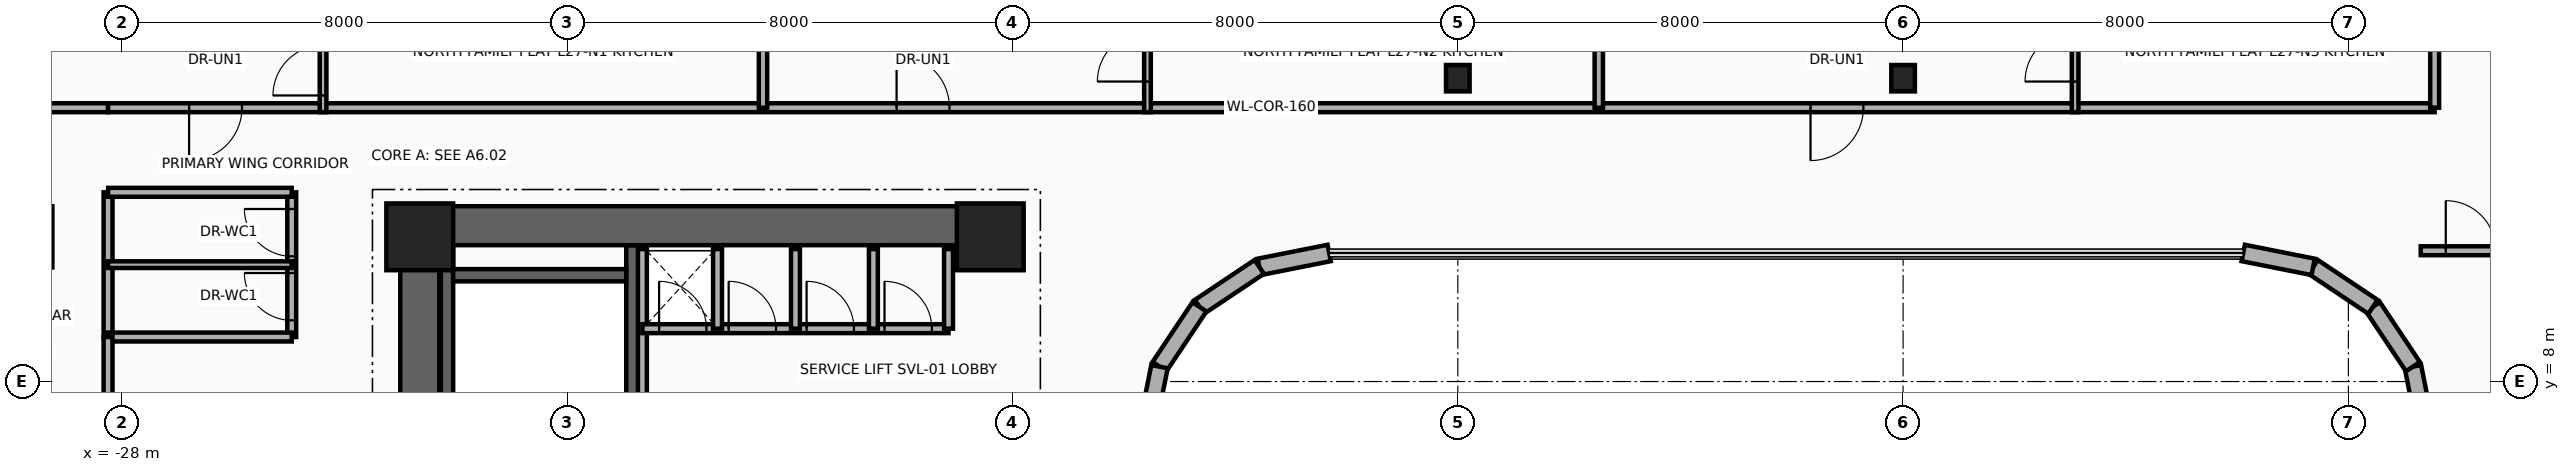
"""IFC4 building model, lengths in metres.
Left out: names, types, materials, properties, quantities, classifications, styles, units other than length and angle.
Written with IfcOpenShell. Run it as: python <this file> out.ifc"""

import sys

from ifc_helpers import new_model, si_unit, direction, frame, frame_2d, origin, origin_2d, place, context, subcontext, project, spatial, rectangle, i_section, extrude, source, transform, mapped, element, fill, save


model = new_model("IFC4")
c1 = context("Model", 3, precision=1e-05, world=origin(), true_north=direction((0.0, 1.0)))
c2 = subcontext(c1, "Body", "Model", "MODEL_VIEW")
j1 = project(units=[si_unit("LENGTHUNIT", "METRE"), si_unit("PLANEANGLEUNIT", "RADIAN")], contexts=[c1])
p1 = place(None, origin())
s1 = spatial("IfcSite", under=j1, at=p1, CompositionType="ELEMENT")
p2 = place(p1, origin())
s2 = spatial("IfcBuilding", under=s1, at=p2, CompositionType="ELEMENT")
p3 = place(p2, frame((0.0, 0.0, 109.4)))
s3 = spatial("IfcBuildingStorey", under=s2, at=p3, CompositionType="ELEMENT", Elevation=109.4)
for number, where, z_axis, x_axis in (
    (1, (-22.16, 1.78, 0.0), (0.0, 0.0, 1.0), (0.0, 1.0, 0.0)),
    (2, (-18.83, 1.78, 0.0), (0.0, 0.0, 1.0), (0.0, 1.0, 0.0)),
):
    element("IfcWall", number, at=place(p3, frame(where, z_axis=z_axis, x_axis=x_axis)), inside=s3, PredefinedType="SHEAR", context=c2, shape_type="SweptSolid", body=[
        extrude(rectangle(XDim=8.67, YDim=0.22, at=frame_2d((4.335, 0.0))), origin(), (0.0, 0.0, 1.0), 3.46),
    ])
p4 = place(p3, frame((-22.05, 9.91, 0.0), z_axis=(0.0, 0.0, 1.0), x_axis=(1.0, 0.0, 0.0)))
e3 = element("IfcWall", 3, at=p4, inside=s3, PredefinedType="SHEAR", context=c2, shape_type="SweptSolid", body=[
    extrude(rectangle(XDim=3.11, YDim=0.22, at=frame_2d((1.555, 0.0))), origin(), (0.0, 0.0, 1.0), 3.46),
])
p5 = place(p3, frame((-22.65, -11.15, 0.0), z_axis=(0.0, 0.0, 1.0), x_axis=(0.0, 1.0, 0.0)))
e4 = element("IfcWall", 4, at=p5, inside=s3, PredefinedType="SHEAR", context=c2, shape_type="SweptSolid", body=[
    extrude(rectangle(XDim=22.3, YDim=0.7, at=frame_2d((11.15, 0.0))), origin(), (0.0, 0.0, 1.0), 3.46),
])
p6 = place(p3, frame((-22.65, 10.8, 0.0), z_axis=(0.0, 0.0, 1.0), x_axis=(1.0, 0.0, 0.0)))
e5 = element("IfcWall", 5, at=p6, inside=s3, PredefinedType="SHEAR", context=c2, shape_type="SweptSolid", body=[
    extrude(rectangle(XDim=10.25, YDim=0.7, at=frame_2d((5.125, 0.0))), origin(), (0.0, 0.0, 1.0), 3.46),
])
m1 = source(origin(), c2, "Body", "SweptSolid", [
    extrude(rectangle(XDim=1.2, YDim=1.2, at=origin_2d()), origin(), (0.0, 0.0, 1.0), 3.7),
])
for number, where, z_axis, x_axis in (
    (6, (-22.65, 10.6, 0.0), (0.0, 0.0, 1.0), (1.0, 0.0, 0.0)),
    (7, (-12.4, 10.6, 0.0), (0.0, 0.0, 1.0), (1.0, 0.0, 0.0)),
):
    element("IfcColumn", number, at=place(p3, frame(where, z_axis=z_axis, x_axis=x_axis)), inside=s3, PredefinedType="COLUMN", context=c2, shape_type="MappedRepresentation", body=[
        mapped(m1, transform((0.0, 0.0, 0.0), x_axis=(1.0, 0.0, 0.0), y_axis=(0.0, 1.0, 0.0), z_axis=(0.0, 0.0, 1.0), scale=1.0)),
    ])
m2 = source(origin(), c2, "Body", "SweptSolid", [
    extrude(i_section(OverallWidth=0.424, OverallDepth=0.474, WebThickness=0.048, FlangeThickness=0.077, at=origin_2d()), origin(), (0.0, 0.0, 1.0), 3.7),
])
for number, where, z_axis, x_axis in (
    (8, (-4.0, 13.45, 0.0), (0.0, 0.0, 1.0), (1.0, 0.0, 0.0)),
    (9, (4.0, 13.45, 0.0), (0.0, 0.0, 1.0), (1.0, 0.0, 0.0)),
):
    element("IfcColumn", number, at=place(p3, frame(where, z_axis=z_axis, x_axis=x_axis)), inside=s3, PredefinedType="COLUMN", context=c2, shape_type="MappedRepresentation", body=[
        mapped(m2, transform((0.0, 0.0, 0.0), x_axis=(1.0, 0.0, 0.0), y_axis=(0.0, 1.0, 0.0), z_axis=(0.0, 0.0, 1.0), scale=1.0)),
    ])
p7 = place(p3, frame((13.41, 7.011, 0.0), z_axis=(0.0, 0.0, 1.0), x_axis=(-0.195090163074, 0.980785312019, 0.0)))
e10 = element("IfcWall", 10, at=p7, inside=s3, PredefinedType="SOLIDWALL", context=c2, shape_type="SweptSolid", body=[
    extrude(rectangle(XDim=1.281, YDim=0.3, at=frame_2d((0.641, 0.0))), origin(), (0.0, 0.0, 1.0), 3.46),
])
for number, where, z_axis, x_axis in (
    (11, (13.16, 8.268, 0.0), (0.0, 0.0, 1.0), (-0.556, 0.831, 0.0)),
    (12, (12.442, 9.342, 0.0), (0.0, 0.0, 1.0), (-0.831, 0.556, 0.0)),
):
    element("IfcWall", number, at=place(p3, frame(where, z_axis=z_axis, x_axis=x_axis)), inside=s3, PredefinedType="SOLIDWALL", context=c2, shape_type="SweptSolid", body=[
        extrude(rectangle(XDim=1.292, YDim=0.3, at=frame_2d((0.646, 0.0))), origin(), (0.0, 0.0, 1.0), 3.46),
    ])
for number, where, z_axis, x_axis in (
    (13, (11.367, 10.06, 0.0), (0.0, 0.0, 1.0), (-0.981, 0.195, 0.0)),
    (14, (-6.311, 10.31, 0.0), (0.0, 0.0, 1.0), (-0.981, -0.195, 0.0)),
):
    element("IfcWall", number, at=place(p3, frame(where, z_axis=z_axis, x_axis=x_axis)), inside=s3, PredefinedType="SOLIDWALL", context=c2, shape_type="SweptSolid", body=[
        extrude(rectangle(XDim=1.281, YDim=0.3, at=frame_2d((0.641, 0.0))), origin(), (0.0, 0.0, 1.0), 3.46),
    ])
p8 = place(p3, frame((-7.567, 10.06, 0.0), z_axis=(0.0, 0.0, 1.0), x_axis=(-0.831497739511, -0.555528135371, 0.0)))
e15 = element("IfcWall", 15, at=p8, inside=s3, PredefinedType="SOLIDWALL", context=c2, shape_type="SweptSolid", body=[
    extrude(rectangle(XDim=1.292, YDim=0.3, at=frame_2d((0.646, 0.0))), origin(), (0.0, 0.0, 1.0), 3.46),
])
p9 = place(p3, frame((-8.642, 9.342, 0.0), z_axis=(0.0, 0.0, 1.0), x_axis=(-0.555615398575, -0.831439431869, 0.0)))
e16 = element("IfcWall", 16, at=p9, inside=s3, PredefinedType="SOLIDWALL", context=c2, shape_type="SweptSolid", body=[
    extrude(rectangle(XDim=1.292, YDim=0.3, at=frame_2d((0.646, 0.0))), origin(), (0.0, 0.0, 1.0), 3.46),
])
p10 = place(p3, frame((-9.36, 8.268, 0.0), z_axis=(0.0, 0.0, 1.0), x_axis=(-0.195090163074, -0.980785312019, 0.0)))
e17 = element("IfcWall", 17, at=p10, inside=s3, PredefinedType="SOLIDWALL", context=c2, shape_type="SweptSolid", body=[
    extrude(rectangle(XDim=1.281, YDim=0.3, at=frame_2d((0.641, 0.0))), origin(), (0.0, 0.0, 1.0), 3.46),
])
p11 = place(p3, frame((-18.65, 7.45, 0.0), z_axis=(0.0, 0.0, 1.0), x_axis=(0.0, 1.0, 0.0)))
e18 = element("IfcWall", 18, at=p11, inside=s3, PredefinedType="PARTITIONING", context=c2, shape_type="SweptSolid", body=[
    extrude(rectangle(XDim=2.93, YDim=0.16, at=frame_2d((1.465, 0.0))), origin(), (0.0, 0.0, 1.0), 3.46),
])
p12 = place(p3, frame((-18.65, 8.95, 0.0), z_axis=(0.0, 0.0, 1.0), x_axis=(1.0, 0.0, 0.0)))
e19 = element("IfcWall", 19, at=p12, inside=s3, PredefinedType="PARTITIONING", context=c2, shape_type="SweptSolid", body=[
    extrude(rectangle(XDim=5.5, YDim=0.16, at=frame_2d((2.75, 0.0))), origin(), (0.0, 0.0, 1.0), 3.46),
])
p13 = place(p12, frame((0.3, 0.0, 0.0)))
e20 = element("IfcOpeningElement", 20, at=p13, cuts=e19, PredefinedType="OPENING", context=c2, shape_type="SweptSolid", body=[
    extrude(rectangle(XDim=0.85, YDim=2.05, at=frame_2d((0.425, 1.025))), frame((0.0, 0.095, 0.0), z_axis=(0.0, -1.0, 0.0), x_axis=(1.0, 0.0, 0.0)), (0.0, 0.0, 1.0), 0.19),
])
p14 = place(p12, frame((1.55, 0.0, 0.0)))
e21 = element("IfcOpeningElement", 21, at=p14, cuts=e19, PredefinedType="OPENING", context=c2, shape_type="SweptSolid", body=[
    extrude(rectangle(XDim=0.85, YDim=2.05, at=frame_2d((0.425, 1.025))), frame((0.0, 0.095, 0.0), z_axis=(0.0, -1.0, 0.0), x_axis=(1.0, 0.0, 0.0)), (0.0, 0.0, 1.0), 0.19),
])
p15 = place(p12, frame((2.95, 0.0, 0.0)))
e22 = element("IfcOpeningElement", 22, at=p15, cuts=e19, PredefinedType="OPENING", context=c2, shape_type="SweptSolid", body=[
    extrude(rectangle(XDim=0.85, YDim=2.05, at=frame_2d((0.425, 1.025))), frame((0.0, 0.095, 0.0), z_axis=(0.0, -1.0, 0.0), x_axis=(1.0, 0.0, 0.0)), (0.0, 0.0, 1.0), 0.19),
])
p16 = place(p12, frame((4.35, 0.0, 0.0)))
e23 = element("IfcOpeningElement", 23, at=p16, cuts=e19, PredefinedType="OPENING", context=c2, shape_type="SweptSolid", body=[
    extrude(rectangle(XDim=0.85, YDim=2.05, at=frame_2d((0.425, 1.025))), frame((0.0, 0.095, 0.0), z_axis=(0.0, -1.0, 0.0), x_axis=(1.0, 0.0, 0.0)), (0.0, 0.0, 1.0), 0.19),
])
for number, where, z_axis, x_axis in (
    (24, (-13.15, 8.95, 0.0), (0.0, 0.0, 1.0), (0.0, 1.0, 0.0)),
    (25, (-17.3, 8.95, 0.0), (0.0, 0.0, 1.0), (0.0, 1.0, 0.0)),
    (26, (-15.9, 8.95, 0.0), (0.0, 0.0, 1.0), (0.0, 1.0, 0.0)),
    (27, (-14.5, 8.95, 0.0), (0.0, 0.0, 1.0), (0.0, 1.0, 0.0)),
):
    element("IfcWall", number, at=place(p3, frame(where, z_axis=z_axis, x_axis=x_axis)), inside=s3, PredefinedType="PARTITIONING", context=c2, shape_type="SweptSolid", body=[
        extrude(rectangle(XDim=1.43, YDim=0.16, at=frame_2d((0.715, 0.0))), origin(), (0.0, 0.0, 1.0), 3.46),
    ])
p17 = place(p3, frame((-28.25, 8.8, 0.0), z_axis=(0.0, 0.0, 1.0), x_axis=(0.0, 1.0, 0.0)))
e28 = element("IfcWall", 28, at=p17, inside=s3, PredefinedType="PARTITIONING", context=c2, shape_type="SweptSolid", body=[
    extrude(rectangle(XDim=2.6, YDim=0.16, at=frame_2d((1.3, 0.0))), origin(), (0.0, 0.0, 1.0), 2.666),
])
p18 = place(p3, frame((-24.95, 8.8, 0.0), z_axis=(0.0, 0.0, 1.0), x_axis=(0.0, 1.0, 0.0)))
e29 = element("IfcWall", 29, at=p18, inside=s3, PredefinedType="PARTITIONING", context=c2, shape_type="SweptSolid", body=[
    extrude(rectangle(XDim=2.6, YDim=0.16, at=frame_2d((1.3, 0.0))), origin(), (0.0, 0.0, 1.0), 2.666),
])
p19 = place(p18, frame((0.3, 0.0, 0.0)))
e30 = element("IfcOpeningElement", 30, at=p19, cuts=e29, PredefinedType="OPENING", context=c2, shape_type="SweptSolid", body=[
    extrude(rectangle(XDim=0.85, YDim=2.1, at=frame_2d((0.425, 1.05))), frame((0.0, 0.095, 0.0), z_axis=(0.0, -1.0, 0.0), x_axis=(1.0, 0.0, 0.0)), (0.0, 0.0, 1.0), 0.19),
])
p20 = place(p18, frame((1.45, 0.0, 0.0)))
e31 = element("IfcOpeningElement", 31, at=p20, cuts=e29, PredefinedType="OPENING", context=c2, shape_type="SweptSolid", body=[
    extrude(rectangle(XDim=0.85, YDim=2.1, at=frame_2d((0.425, 1.05))), frame((0.0, 0.095, 0.0), z_axis=(0.0, -1.0, 0.0), x_axis=(1.0, 0.0, 0.0)), (0.0, 0.0, 1.0), 0.19),
])
for number, where, z_axis, x_axis in (
    (32, (-28.25, 8.8, 0.0), (0.0, 0.0, 1.0), (1.0, 0.0, 0.0)),
    (33, (-28.25, 11.4, 0.0), (0.0, 0.0, 1.0), (1.0, 0.0, 0.0)),
):
    element("IfcWall", number, at=place(p3, frame(where, z_axis=z_axis, x_axis=x_axis)), inside=s3, PredefinedType="PARTITIONING", context=c2, shape_type="SweptSolid", body=[
        extrude(rectangle(XDim=3.3, YDim=0.16, at=frame_2d((1.65, 0.0))), origin(), (0.0, 0.0, 1.0), 3.46),
    ])
p21 = place(p3, frame((-28.25, 10.1, 0.0), z_axis=(0.0, 0.0, 1.0), x_axis=(1.0, 0.0, 0.0)))
e34 = element("IfcWall", 34, at=p21, inside=s3, PredefinedType="PARTITIONING", context=c2, shape_type="SweptSolid", body=[
    extrude(rectangle(XDim=3.3, YDim=0.12, at=frame_2d((1.65, 0.0))), origin(), (0.0, 0.0, 1.0), 3.46),
])
p22 = place(p3, frame((-28.25, 7.2, 0.0), z_axis=(0.0, 0.0, 1.0), x_axis=(0.0, 1.0, 0.0)))
e35 = element("IfcWall", 35, at=p22, inside=s3, PredefinedType="PARTITIONING", context=c2, shape_type="SweptSolid", body=[
    extrude(rectangle(XDim=1.6, YDim=0.16, at=frame_2d((0.8, 0.0))), origin(), (0.0, 0.0, 1.0), 2.988),
])
p23 = place(p3, frame((-30.89, 12.92, 0.0), z_axis=(0.0, 0.0, 1.0), x_axis=(1.0, 0.0, 0.0)))
e36 = element("IfcWall", 36, at=p23, inside=s3, PredefinedType="PARTITIONING", context=c2, shape_type="SweptSolid", body=[
    extrude(rectangle(XDim=2.64, YDim=0.16, at=frame_2d((1.32, 0.0))), origin(), (0.0, 0.0, 1.0), 2.896),
])
p24 = place(p3, frame((-28.25, 12.92, 0.0), z_axis=(0.0, 0.0, 1.0), x_axis=(1.0, 0.0, 0.0)))
e37 = element("IfcWall", 37, at=p24, inside=s3, PredefinedType="PARTITIONING", context=c2, shape_type="SweptSolid", body=[
    extrude(rectangle(XDim=41.8, YDim=0.16, at=frame_2d((20.9, 0.0))), origin(), (0.0, 0.0, 1.0), 2.666),
])
p25 = place(p24, frame((1.456, 0.0, 0.0)))
e38 = element("IfcOpeningElement", 38, at=p25, cuts=e37, PredefinedType="OPENING", context=c2, shape_type="SweptSolid", body=[
    extrude(rectangle(XDim=0.95, YDim=2.15, at=frame_2d((0.475, 1.075))), frame((0.0, 0.095, 0.0), z_axis=(0.0, -1.0, 0.0), x_axis=(1.0, 0.0, 0.0)), (0.0, 0.0, 1.0), 0.19),
])
p26 = place(p24, frame((14.167, 0.0, 0.0)))
e39 = element("IfcOpeningElement", 39, at=p26, cuts=e37, PredefinedType="OPENING", context=c2, shape_type="SweptSolid", body=[
    extrude(rectangle(XDim=0.95, YDim=2.15, at=frame_2d((0.475, 1.075))), frame((0.0, 0.095, 0.0), z_axis=(0.0, -1.0, 0.0), x_axis=(1.0, 0.0, 0.0)), (0.0, 0.0, 1.0), 0.19),
])
p27 = place(p24, frame((30.587, 0.0, 0.0)))
e40 = element("IfcOpeningElement", 40, at=p27, cuts=e37, PredefinedType="OPENING", context=c2, shape_type="SweptSolid", body=[
    extrude(rectangle(XDim=0.95, YDim=2.15, at=frame_2d((0.475, 1.075))), frame((0.0, 0.095, 0.0), z_axis=(0.0, -1.0, 0.0), x_axis=(1.0, 0.0, 0.0)), (0.0, 0.0, 1.0), 0.19),
])
p28 = place(p3, frame((13.55, 12.92, 0.0), z_axis=(0.0, 0.0, 1.0), x_axis=(0.0, 1.0, 0.0)))
e41 = element("IfcWall", 41, at=p28, inside=s3, PredefinedType="PARTITIONING", context=c2, shape_type="SweptSolid", body=[
    extrude(rectangle(XDim=5.857, YDim=0.16, at=frame_2d((2.928, 0.0))), origin(), (0.0, 0.0, 1.0), 2.666),
])
p29 = place(p3, frame((-16.483, 12.92, 0.0), z_axis=(0.0, 0.0, 1.0), x_axis=(0.0, 1.0, 0.0)))
e42 = element("IfcWall", 42, at=p29, inside=s3, PredefinedType="PARTITIONING", context=c2, shape_type="SweptSolid", body=[
    extrude(rectangle(XDim=7.004, YDim=0.15, at=frame_2d((3.502, 0.0))), origin(), (0.0, 0.0, 1.0), 2.666),
])
p30 = place(p3, frame((-1.467, 12.92, 0.0), z_axis=(0.0, 0.0, 1.0), x_axis=(0.0, 1.0, 0.0)))
e43 = element("IfcWall", 43, at=p30, inside=s3, PredefinedType="PARTITIONING", context=c2, shape_type="SweptSolid", body=[
    extrude(rectangle(XDim=7.037, YDim=0.15, at=frame_2d((3.518, 0.0))), origin(), (0.0, 0.0, 1.0), 2.666),
])
p31 = place(p3, frame((-24.387, 12.84, 0.0), z_axis=(0.0, 0.0, 1.0), x_axis=(0.0, 1.0, 0.0)))
e44 = element("IfcWall", 44, at=p31, inside=s3, PredefinedType="PARTITIONING", context=c2, shape_type="SweptSolid", body=[
    extrude(rectangle(XDim=2.08, YDim=0.12, at=frame_2d((1.04, 0.0))), origin(), (0.0, 0.0, 1.0), 2.666),
])
p32 = place(p31, frame((0.3, 0.0, 0.0)))
e45 = element("IfcOpeningElement", 45, at=p32, cuts=e44, PredefinedType="OPENING", context=c2, shape_type="SweptSolid", body=[
    extrude(rectangle(XDim=0.9, YDim=2.1, at=frame_2d((0.45, 1.05))), frame((0.0, 0.075, 0.0), z_axis=(0.0, -1.0, 0.0), x_axis=(1.0, 0.0, 0.0)), (0.0, 0.0, 1.0), 0.15),
])
p33 = place(p3, frame((-9.576, 12.84, 0.0), z_axis=(0.0, 0.0, 1.0), x_axis=(0.0, 1.0, 0.0)))
e46 = element("IfcWall", 46, at=p33, inside=s3, PredefinedType="PARTITIONING", context=c2, shape_type="SweptSolid", body=[
    extrude(rectangle(XDim=2.08, YDim=0.12, at=frame_2d((1.04, 0.0))), origin(), (0.0, 0.0, 1.0), 2.666),
])
p34 = place(p33, frame((0.55, 0.0, 0.0)))
e47 = element("IfcOpeningElement", 47, at=p34, cuts=e46, PredefinedType="OPENING", context=c2, shape_type="SweptSolid", body=[
    extrude(rectangle(XDim=0.9, YDim=2.1, at=frame_2d((0.45, 1.05))), frame((0.0, 0.075, 0.0), z_axis=(0.0, -1.0, 0.0), x_axis=(1.0, 0.0, 0.0)), (0.0, 0.0, 1.0), 0.15),
])
p35 = place(p3, frame((7.091, 12.84, 0.0), z_axis=(0.0, 0.0, 1.0), x_axis=(0.0, 1.0, 0.0)))
e48 = element("IfcWall", 48, at=p35, inside=s3, PredefinedType="PARTITIONING", context=c2, shape_type="SweptSolid", body=[
    extrude(rectangle(XDim=2.08, YDim=0.12, at=frame_2d((1.04, 0.0))), origin(), (0.0, 0.0, 1.0), 2.666),
])
p36 = place(p35, frame((0.55, 0.0, 0.0)))
e49 = element("IfcOpeningElement", 49, at=p36, cuts=e48, PredefinedType="OPENING", context=c2, shape_type="SweptSolid", body=[
    extrude(rectangle(XDim=0.9, YDim=2.1, at=frame_2d((0.45, 1.05))), frame((0.0, 0.075, 0.0), z_axis=(0.0, -1.0, 0.0), x_axis=(1.0, 0.0, 0.0)), (0.0, 0.0, 1.0), 0.15),
])
p37 = place(p3, frame((13.3, 10.35, 0.0), z_axis=(0.0, 0.0, 1.0), x_axis=(1.0, 0.0, 0.0)))
e50 = element("IfcWall", 50, at=p37, inside=s3, PredefinedType="PARTITIONING", context=c2, shape_type="SweptSolid", body=[
    extrude(rectangle(XDim=2.1, YDim=0.16, at=frame_2d((1.05, 0.0))), origin(), (0.0, 0.0, 1.0), 2.666),
])
p38 = place(p37, frame((0.45, 0.0, 0.0)))
e51 = element("IfcOpeningElement", 51, at=p38, cuts=e50, PredefinedType="OPENING", context=c2, shape_type="SweptSolid", body=[
    extrude(rectangle(XDim=0.9, YDim=2.1, at=frame_2d((0.45, 1.05))), frame((0.0, 0.095, 0.0), z_axis=(0.0, -1.0, 0.0), x_axis=(1.0, 0.0, 0.0)), (0.0, 0.0, 1.0), 0.19),
])
p39 = place(p13, origin())
e52 = element("IfcDoor", 52, at=p39, inside=s3, OperationType="SINGLE_SWING_LEFT", PredefinedType="DOOR", context=c2, shape_type="SweptSolid", body=[
    extrude(rectangle(XDim=0.85, YDim=2.05, at=frame_2d((0.425, 1.025))), frame((0.0, 0.025, 0.0), z_axis=(0.0, -1.0, 0.0), x_axis=(1.0, 0.0, 0.0)), (0.0, 0.0, 1.0), 0.05),
])
fill(e20, e52)
p40 = place(p14, origin())
e53 = element("IfcDoor", 53, at=p40, inside=s3, OperationType="SINGLE_SWING_RIGHT", PredefinedType="DOOR", context=c2, shape_type="SweptSolid", body=[
    extrude(rectangle(XDim=0.85, YDim=2.05, at=frame_2d((0.425, 1.025))), frame((0.0, 0.025, 0.0), z_axis=(0.0, -1.0, 0.0), x_axis=(1.0, 0.0, 0.0)), (0.0, 0.0, 1.0), 0.05),
])
fill(e21, e53)
p41 = place(p15, origin())
e54 = element("IfcDoor", 54, at=p41, inside=s3, OperationType="SINGLE_SWING_LEFT", PredefinedType="DOOR", context=c2, shape_type="SweptSolid", body=[
    extrude(rectangle(XDim=0.85, YDim=2.05, at=frame_2d((0.425, 1.025))), frame((0.0, 0.025, 0.0), z_axis=(0.0, -1.0, 0.0), x_axis=(1.0, 0.0, 0.0)), (0.0, 0.0, 1.0), 0.05),
])
fill(e22, e54)
p42 = place(p16, origin())
e55 = element("IfcDoor", 55, at=p42, inside=s3, OperationType="SINGLE_SWING_RIGHT", PredefinedType="DOOR", context=c2, shape_type="SweptSolid", body=[
    extrude(rectangle(XDim=0.85, YDim=2.05, at=frame_2d((0.425, 1.025))), frame((0.0, 0.025, 0.0), z_axis=(0.0, -1.0, 0.0), x_axis=(1.0, 0.0, 0.0)), (0.0, 0.0, 1.0), 0.05),
])
fill(e23, e55)
p43 = place(p19, origin())
e56 = element("IfcDoor", 56, at=p43, inside=s3, OperationType="SINGLE_SWING_RIGHT", PredefinedType="DOOR", context=c2, shape_type="SweptSolid", body=[
    extrude(rectangle(XDim=0.85, YDim=2.1, at=frame_2d((0.425, 1.05))), frame((0.0, 0.025, 0.0), z_axis=(0.0, -1.0, 0.0), x_axis=(1.0, 0.0, 0.0)), (0.0, 0.0, 1.0), 0.05),
])
fill(e30, e56)
p44 = place(p20, origin())
e57 = element("IfcDoor", 57, at=p44, inside=s3, OperationType="SINGLE_SWING_LEFT", PredefinedType="DOOR", context=c2, shape_type="SweptSolid", body=[
    extrude(rectangle(XDim=0.85, YDim=2.1, at=frame_2d((0.425, 1.05))), frame((0.0, 0.025, 0.0), z_axis=(0.0, -1.0, 0.0), x_axis=(1.0, 0.0, 0.0)), (0.0, 0.0, 1.0), 0.05),
])
fill(e31, e57)
p45 = place(p25, frame((0.95, 0.0, 0.0), z_axis=(0.0, 0.0, 1.0), x_axis=(-1.0, 0.0, 0.0)))
e58 = element("IfcDoor", 58, at=p45, inside=s3, OperationType="SINGLE_SWING_LEFT", PredefinedType="DOOR", context=c2, shape_type="SweptSolid", body=[
    extrude(rectangle(XDim=0.95, YDim=2.15, at=frame_2d((0.475, 1.075))), frame((0.0, 0.025, 0.0), z_axis=(0.0, -1.0, 0.0), x_axis=(1.0, 0.0, 0.0)), (0.0, 0.0, 1.0), 0.05),
])
fill(e38, e58)
p46 = place(p32, origin())
e59 = element("IfcDoor", 59, at=p46, inside=s3, OperationType="SINGLE_SWING_LEFT", PredefinedType="DOOR", context=c2, shape_type="SweptSolid", body=[
    extrude(rectangle(XDim=0.9, YDim=2.1, at=frame_2d((0.45, 1.05))), frame((0.0, 0.025, 0.0), z_axis=(0.0, -1.0, 0.0), x_axis=(1.0, 0.0, 0.0)), (0.0, 0.0, 1.0), 0.05),
])
fill(e45, e59)
p47 = place(p26, origin())
e60 = element("IfcDoor", 60, at=p47, inside=s3, OperationType="SINGLE_SWING_RIGHT", PredefinedType="DOOR", context=c2, shape_type="SweptSolid", body=[
    extrude(rectangle(XDim=0.95, YDim=2.15, at=frame_2d((0.475, 1.075))), frame((0.0, 0.025, 0.0), z_axis=(0.0, -1.0, 0.0), x_axis=(1.0, 0.0, 0.0)), (0.0, 0.0, 1.0), 0.05),
])
fill(e39, e60)
p48 = place(p34, origin())
e61 = element("IfcDoor", 61, at=p48, inside=s3, OperationType="SINGLE_SWING_RIGHT", PredefinedType="DOOR", context=c2, shape_type="SweptSolid", body=[
    extrude(rectangle(XDim=0.9, YDim=2.1, at=frame_2d((0.45, 1.05))), frame((0.0, 0.025, 0.0), z_axis=(0.0, -1.0, 0.0), x_axis=(1.0, 0.0, 0.0)), (0.0, 0.0, 1.0), 0.05),
])
fill(e47, e61)
p49 = place(p27, frame((0.95, 0.0, 0.0), z_axis=(0.0, 0.0, 1.0), x_axis=(-1.0, 0.0, 0.0)))
e62 = element("IfcDoor", 62, at=p49, inside=s3, OperationType="SINGLE_SWING_LEFT", PredefinedType="DOOR", context=c2, shape_type="SweptSolid", body=[
    extrude(rectangle(XDim=0.95, YDim=2.15, at=frame_2d((0.475, 1.075))), frame((0.0, 0.025, 0.0), z_axis=(0.0, -1.0, 0.0), x_axis=(1.0, 0.0, 0.0)), (0.0, 0.0, 1.0), 0.05),
])
fill(e40, e62)
p50 = place(p36, origin())
e63 = element("IfcDoor", 63, at=p50, inside=s3, OperationType="SINGLE_SWING_LEFT", PredefinedType="DOOR", context=c2, shape_type="SweptSolid", body=[
    extrude(rectangle(XDim=0.9, YDim=2.1, at=frame_2d((0.45, 1.05))), frame((0.0, 0.025, 0.0), z_axis=(0.0, -1.0, 0.0), x_axis=(1.0, 0.0, 0.0)), (0.0, 0.0, 1.0), 0.05),
])
fill(e49, e63)
p51 = place(p38, origin())
e64 = element("IfcDoor", 64, at=p51, inside=s3, OperationType="SINGLE_SWING_RIGHT", PredefinedType="DOOR", context=c2, shape_type="SweptSolid", body=[
    extrude(rectangle(XDim=0.9, YDim=2.1, at=frame_2d((0.45, 1.05))), frame((0.0, 0.025, 0.0), z_axis=(0.0, -1.0, 0.0), x_axis=(1.0, 0.0, 0.0)), (0.0, 0.0, 1.0), 0.05),
])
fill(e51, e64)
save(model, sys.argv[1])
